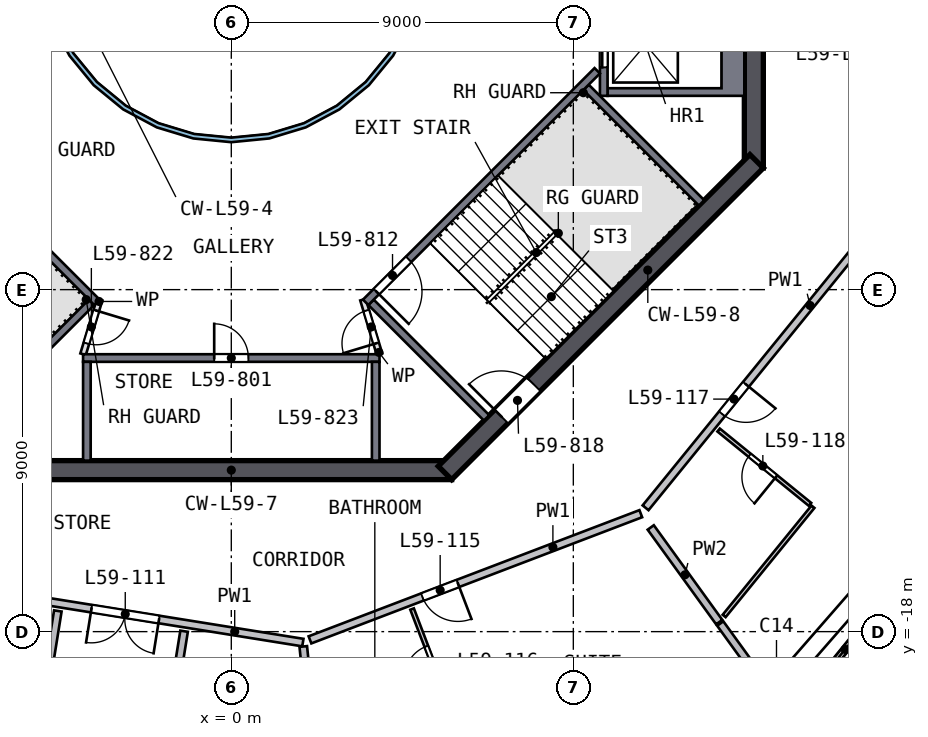
"""IFC4 building model, lengths in metres.
Left out: names, types, materials, properties, quantities, classifications, styles, units other than length and angle.
Written with IfcOpenShell. Run it as: python <this file> out.ifc"""

import sys

from ifc_helpers import new_model, si_unit, direction, frame, frame_2d, origin, place, context, subcontext, project, spatial, polyline, rectangle, outline, extrude, element, fill, save


model = new_model("IFC4")
c1 = context("Model", 3, precision=1e-05, world=origin(), true_north=direction((0.0, 1.0)))
c2 = subcontext(c1, "Body", "Model", "MODEL_VIEW")
j1 = project(units=[si_unit("LENGTHUNIT", "METRE"), si_unit("PLANEANGLEUNIT", "RADIAN")], contexts=[c1])
p1 = place(None, origin())
s1 = spatial("IfcSite", under=j1, at=p1, CompositionType="ELEMENT")
p2 = place(p1, origin())
s2 = spatial("IfcBuilding", under=s1, at=p2, CompositionType="ELEMENT")
p3 = place(p2, frame((0.0, 0.0, 241.0)))
s3 = spatial("IfcBuildingStorey", under=s2, at=p3, CompositionType="ELEMENT", Elevation=241.0)
p4 = place(p3, frame((13.75, -5.799, 0.0), z_axis=(0.0, 0.0, 1.0), x_axis=(0.0, 1.0, 0.0)))
e1 = element("IfcWall", 1, at=p4, inside=s3, PredefinedType="SHEAR", context=c2, shape_type="SweptSolid", body=[
    extrude(rectangle(XDim=11.598, YDim=0.5, at=frame_2d((5.799, 0.0))), origin(), (0.0, 0.0, 1.0), 3.5),
])
p5 = place(p4, frame((4.899, 0.0, 0.0)))
e2 = element("IfcOpeningElement", 2, at=p5, cuts=e1, PredefinedType="OPENING", context=c2, shape_type="SweptSolid", body=[
    extrude(rectangle(XDim=1.8, YDim=2.1, at=frame_2d((0.9, 1.05))), frame((0.0, 0.26, 0.0), z_axis=(0.0, -1.0, 0.0), x_axis=(1.0, 0.0, 0.0)), (0.0, 0.0, 1.0), 0.52),
])
p6 = place(p3, frame((-5.799, -13.75, 0.0), z_axis=(0.0, 0.0, 1.0), x_axis=(1.0, 0.0, 0.0)))
e3 = element("IfcWall", 3, at=p6, inside=s3, PredefinedType="SHEAR", context=c2, shape_type="SweptSolid", body=[
    extrude(rectangle(XDim=11.598, YDim=0.5, at=frame_2d((5.799, 0.0))), origin(), (0.0, 0.0, 1.0), 3.5),
])
p7 = place(p3, frame((5.622, -13.823, 0.0), z_axis=(0.0, 0.0, 1.0), x_axis=(0.707106781, 0.707106781, 0.0)))
e4 = element("IfcWall", 4, at=p7, inside=s3, PredefinedType="SHEAR", context=c2, shape_type="SweptSolid", body=[
    extrude(rectangle(XDim=11.598, YDim=0.5, at=frame_2d((5.799, 0.0))), origin(), (0.0, 0.0, 1.0), 3.5),
])
p8 = place(p7, frame((2.099, 0.0, 0.0)))
e5 = element("IfcOpeningElement", 5, at=p8, cuts=e4, PredefinedType="OPENING", context=c2, shape_type="SweptSolid", body=[
    extrude(rectangle(XDim=1.2, YDim=2.1, at=frame_2d((0.6, 1.05))), frame((0.0, 0.26, 0.0), z_axis=(0.0, -1.0, 0.0), x_axis=(1.0, 0.0, 0.0)), (0.0, 0.0, 1.0), 0.52),
])
p9 = place(p3, frame((14.724, -20.224, 0.0), z_axis=(0.0, 0.0, 1.0), x_axis=(0.630963708, 0.775812348, 0.0)))
e6 = element("IfcWall", 6, at=p9, inside=s3, PredefinedType="SOLIDWALL", context=c2, shape_type="SweptSolid", body=[
    extrude(rectangle(XDim=3.863, YDim=0.15, at=frame_2d((1.932, 0.0))), origin(), (0.0, 0.0, 1.0), 2.525),
])
p10 = place(p9, frame((1.063, 0.0, 0.0)))
e7 = element("IfcOpeningElement", 7, at=p10, cuts=e6, PredefinedType="OPENING", context=c2, shape_type="SweptSolid", body=[
    extrude(rectangle(XDim=2.4, YDim=2.4, at=frame_2d((1.2, 1.2))), frame((0.0, 0.085, 0.0), z_axis=(0.0, -1.0, 0.0), x_axis=(1.0, 0.0, 0.0)), (0.0, 0.0, 1.0), 0.17),
])
p11 = place(p3, origin())
e8 = element("IfcWall", 8, at=p11, inside=s3, PredefinedType="SOLIDWALL", context=c2, shape_type="SweptSolid", body=[
    extrude(outline(polyline([(13.5, -3.9), (9.9, -3.9), (9.9, -3.7), (12.9, -3.7), (12.9, -1.4), (9.9, -1.4), (9.9, -1.2), (13.5, -1.2), (13.5, -3.9)])), origin(), (0.0, 0.0, 1.0), 3.19),
])
p12 = place(p3, frame((9.8, -1.2, 0.0), z_axis=(0.0, 0.0, 1.0), x_axis=(0.0, -1.0, 0.0)))
e9 = element("IfcWall", 9, at=p12, inside=s3, PredefinedType="SOLIDWALL", context=c2, shape_type="SweptSolid", body=[
    extrude(rectangle(XDim=2.7, YDim=0.2, at=frame_2d((1.35, 0.0))), origin(), (0.0, 0.0, 1.0), 3.19),
])
p13 = place(p12, frame((0.75, 0.0, 0.0)))
e10 = element("IfcOpeningElement", 10, at=p13, cuts=e9, PredefinedType="OPENING", context=c2, shape_type="SweptSolid", body=[
    extrude(rectangle(XDim=1.2, YDim=2.1, at=frame_2d((0.6, 1.05))), frame((0.0, 0.11, 0.0), z_axis=(0.0, -1.0, 0.0), x_axis=(1.0, 0.0, 0.0)), (0.0, 0.0, 1.0), 0.22),
])
p14 = place(p3, frame((-3.9, -10.8, 0.0), z_axis=(0.0, 0.0, 1.0), x_axis=(1.0, 0.0, 0.0)))
e11 = element("IfcWall", 11, at=p14, inside=s3, PredefinedType="SOLIDWALL", context=c2, shape_type="SweptSolid", body=[
    extrude(rectangle(XDim=7.8, YDim=0.2, at=frame_2d((3.9, 0.0))), origin(), (0.0, 0.0, 1.0), 3.19),
])
p15 = place(p14, frame((3.45, 0.0, 0.0)))
e12 = element("IfcOpeningElement", 12, at=p15, cuts=e11, PredefinedType="OPENING", context=c2, shape_type="SweptSolid", body=[
    extrude(rectangle(XDim=0.9, YDim=2.1, at=frame_2d((0.45, 1.05))), frame((0.0, 0.11, 0.0), z_axis=(0.0, -1.0, 0.0), x_axis=(1.0, 0.0, 0.0)), (0.0, 0.0, 1.0), 0.22),
])
for number, where, z_axis, x_axis in (
    (13, (-3.8, -10.9, 0.0), (0.0, 0.0, 1.0), (0.0, -1.0, 0.0)),
    (14, (3.8, -10.9, 0.0), (0.0, 0.0, 1.0), (0.0, -1.0, 0.0)),
):
    element("IfcWall", number, at=place(p3, frame(where, z_axis=z_axis, x_axis=x_axis)), inside=s3, PredefinedType="SOLIDWALL", context=c2, shape_type="SweptSolid", body=[
        extrude(rectangle(XDim=2.6, YDim=0.2, at=frame_2d((1.3, 0.0))), origin(), (0.0, 0.0, 1.0), 3.19),
    ])
p16 = place(p3, frame((-3.535, -9.334, 0.0), z_axis=(0.0, 0.0, 1.0), x_axis=(-0.707120946, 0.707092617, 0.0)))
e15 = element("IfcWall", 15, at=p16, inside=s3, PredefinedType="SOLIDWALL", context=c2, shape_type="SweptSolid", body=[
    extrude(rectangle(XDim=8.618, YDim=0.2, at=frame_2d((4.309, 0.0))), origin(), (0.0, 0.0, 1.0), 3.19),
])
p17 = place(p16, frame((6.6, 0.0, 0.0)))
e16 = element("IfcOpeningElement", 16, at=p17, cuts=e15, PredefinedType="OPENING", context=c2, shape_type="SweptSolid", body=[
    extrude(rectangle(XDim=1.2, YDim=2.1, at=frame_2d((0.6, 1.05))), frame((0.0, 0.11, 0.0), z_axis=(0.0, -1.0, 0.0), x_axis=(1.0, 0.0, 0.0)), (0.0, 0.0, 1.0), 0.22),
])
p18 = place(p3, frame((-3.677, -9.334, 0.0), z_axis=(0.0, 0.0, 1.0), x_axis=(-0.707078393, -0.707135168, 0.0)))
e17 = element("IfcWall", 17, at=p18, inside=s3, PredefinedType="SOLIDWALL", context=c2, shape_type="SweptSolid", body=[
    extrude(rectangle(XDim=4.3, YDim=0.2, at=frame_2d((2.15, 0.0))), origin(), (0.0, 0.0, 1.0), 3.19),
])
p19 = place(p3, frame((9.629, -3.24, 0.0), z_axis=(0.0, 0.0, 1.0), x_axis=(-0.707120946, -0.707092617, 0.0)))
e18 = element("IfcWall", 18, at=p19, inside=s3, PredefinedType="SOLIDWALL", context=c2, shape_type="SweptSolid", body=[
    extrude(rectangle(XDim=8.618, YDim=0.2, at=frame_2d((4.309, 0.0))), origin(), (0.0, 0.0, 1.0), 3.19),
])
p20 = place(p19, frame((7.018, 0.0, 0.0)))
e19 = element("IfcOpeningElement", 19, at=p20, cuts=e18, PredefinedType="OPENING", context=c2, shape_type="SweptSolid", body=[
    extrude(rectangle(XDim=1.2, YDim=2.1, at=frame_2d((0.6, 1.05))), frame((0.0, 0.11, 0.0), z_axis=(0.0, -1.0, 0.0), x_axis=(1.0, 0.0, 0.0)), (0.0, 0.0, 1.0), 0.22),
])
for number, where, z_axis, x_axis in (
    (20, (3.677, -9.334, 0.0), (0.0, 0.0, 1.0), (0.707, -0.707, 0.0)),
    (21, (9.334, -3.677, 0.0), (0.0, 0.0, 1.0), (0.707, -0.707, 0.0)),
):
    element("IfcWall", number, at=place(p3, frame(where, z_axis=z_axis, x_axis=x_axis)), inside=s3, PredefinedType="SOLIDWALL", context=c2, shape_type="SweptSolid", body=[
        extrude(rectangle(XDim=4.3, YDim=0.2, at=frame_2d((2.15, 0.0))), origin(), (0.0, 0.0, 1.0), 3.19),
    ])
p21 = place(p3, frame((-3.465, -9.263, 0.0), z_axis=(0.0, 0.0, 1.0), x_axis=(-0.289808785, -0.957084567, 0.0)))
e22 = element("IfcWall", 22, at=p21, inside=s3, PredefinedType="PARTITIONING", context=c2, shape_type="SweptSolid", body=[
    extrude(rectangle(XDim=1.501, YDim=0.15, at=frame_2d((0.75, 0.0))), origin(), (0.0, 0.0, 1.0), 3.19),
])
p22 = place(p21, frame((0.301, 0.0, 0.0)))
e23 = element("IfcOpeningElement", 23, at=p22, cuts=e22, PredefinedType="OPENING", context=c2, shape_type="SweptSolid", body=[
    extrude(rectangle(XDim=0.9, YDim=2.1, at=frame_2d((0.45, 1.05))), frame((0.0, 0.085, 0.0), z_axis=(0.0, -1.0, 0.0), x_axis=(1.0, 0.0, 0.0)), (0.0, 0.0, 1.0), 0.17),
])
p23 = place(p3, frame((3.9, -10.7, 0.0), z_axis=(0.0, 0.0, 1.0), x_axis=(-0.289808785, 0.957084567, 0.0)))
e24 = element("IfcWall", 24, at=p23, inside=s3, PredefinedType="PARTITIONING", context=c2, shape_type="SweptSolid", body=[
    extrude(rectangle(XDim=1.501, YDim=0.15, at=frame_2d((0.75, 0.0))), origin(), (0.0, 0.0, 1.0), 3.19),
])
p24 = place(p23, frame((0.301, 0.0, 0.0)))
e25 = element("IfcOpeningElement", 25, at=p24, cuts=e24, PredefinedType="OPENING", context=c2, shape_type="SweptSolid", body=[
    extrude(rectangle(XDim=0.9, YDim=2.1, at=frame_2d((0.45, 1.05))), frame((0.0, 0.085, 0.0), z_axis=(0.0, -1.0, 0.0), x_axis=(1.0, 0.0, 0.0)), (0.0, 0.0, 1.0), 0.17),
])
p25 = place(p3, origin())
e26 = element("IfcWall", 26, at=p25, inside=s3, PredefinedType="SOLIDWALL", context=c2, shape_type="SweptSolid", body=[
    extrude(outline(polyline([(5.021, -0.999), (4.73, -1.959), (4.257, -2.844), (3.62, -3.62), (2.844, -4.257), (1.959, -4.73), (0.999, -5.021), (0.0, -5.12), (-0.999, -5.021), (-1.959, -4.73), (-2.844, -4.257), (-3.62, -3.62), (-4.257, -2.844), (-4.73, -1.959), (-5.021, -0.999), (-5.12, 0.0), (-5.021, 0.999), (-4.73, 1.959), (-4.257, 2.844), (-3.62, 3.62), (-2.844, 4.257), (-1.959, 4.73), (-0.999, 5.021), (0.0, 5.12), (0.999, 5.021), (1.959, 4.73), (2.844, 4.257), (3.62, 3.62), (4.257, 2.844), (4.73, 1.959), (5.021, 0.999), (5.12, 0.0), (5.021, -0.999)]), holes=[polyline([(4.904, 0.976), (4.619, 1.913), (4.157, 2.778), (3.535, 3.535), (2.778, 4.157), (1.913, 4.619), (0.976, 4.904), (0.0, 5.0), (-0.976, 4.904), (-1.913, 4.619), (-2.778, 4.157), (-3.535, 3.535), (-4.157, 2.778), (-4.619, 1.913), (-4.904, 0.976), (-5.0, 0.0), (-4.904, -0.976), (-4.619, -1.913), (-4.157, -2.778), (-3.535, -3.535), (-2.778, -4.157), (-1.913, -4.619), (-0.976, -4.904), (0.0, -5.0), (0.976, -4.904), (1.913, -4.619), (2.778, -4.157), (3.535, -3.535), (4.157, -2.778), (4.619, -1.913), (4.904, -0.976), (5.0, 0.0), (4.904, 0.976)])]), origin(), (0.0, 0.0, 1.0), 3.19),
])
p26 = place(p3, frame((1.883, -18.288, 0.0), z_axis=(0.0, 0.0, 1.0), x_axis=(-0.987356604, 0.158514786, 0.0)))
e27 = element("IfcWall", 27, at=p26, inside=s3, PredefinedType="SOLIDWALL", context=c2, shape_type="SweptSolid", body=[
    extrude(rectangle(XDim=9.316, YDim=0.2, at=frame_2d((4.658, 0.0))), origin(), (0.0, 0.0, 1.0), 3.19),
])
p27 = place(p26, frame((3.833, 0.0, 0.0)))
e28 = element("IfcOpeningElement", 28, at=p27, cuts=e27, PredefinedType="OPENING", context=c2, shape_type="SweptSolid", body=[
    extrude(rectangle(XDim=1.8, YDim=2.1, at=frame_2d((0.9, 1.05))), frame((0.0, 0.11, 0.0), z_axis=(0.0, -1.0, 0.0), x_axis=(1.0, 0.0, 0.0)), (0.0, 0.0, 1.0), 0.22),
])
p28 = place(p3, frame((10.775, -14.896, 0.0), z_axis=(0.0, 0.0, 1.0), x_axis=(-0.93432948, -0.356410469, 0.0)))
e29 = element("IfcWall", 29, at=p28, inside=s3, PredefinedType="SOLIDWALL", context=c2, shape_type="SweptSolid", body=[
    extrude(rectangle(XDim=9.317, YDim=0.2, at=frame_2d((4.658, 0.0))), origin(), (0.0, 0.0, 1.0), 3.19),
])
p29 = place(p28, frame((5.15, 0.0, 0.0)))
e30 = element("IfcOpeningElement", 30, at=p29, cuts=e29, PredefinedType="OPENING", context=c2, shape_type="SweptSolid", body=[
    extrude(rectangle(XDim=1.0, YDim=2.1, at=frame_2d((0.5, 1.05))), frame((0.0, 0.11, 0.0), z_axis=(0.0, -1.0, 0.0), x_axis=(1.0, 0.0, 0.0)), (0.0, 0.0, 1.0), 0.22),
])
p30 = place(p3, frame((16.792, -7.497, 0.0), z_axis=(0.0, 0.0, 1.0), x_axis=(-0.630941046, -0.775830778, 0.0)))
e31 = element("IfcWall", 31, at=p30, inside=s3, PredefinedType="SOLIDWALL", context=c2, shape_type="SweptSolid", body=[
    extrude(rectangle(XDim=9.337, YDim=0.2, at=frame_2d((4.668, 0.0))), origin(), (0.0, 0.0, 1.0), 3.19),
])
p31 = place(p30, frame((5.15, 0.0, 0.0)))
e32 = element("IfcOpeningElement", 32, at=p31, cuts=e31, PredefinedType="OPENING", context=c2, shape_type="SweptSolid", body=[
    extrude(rectangle(XDim=1.0, YDim=2.1, at=frame_2d((0.5, 1.05))), frame((0.0, 0.11, 0.0), z_axis=(0.0, -1.0, 0.0), x_axis=(1.0, 0.0, 0.0)), (0.0, 0.0, 1.0), 0.22),
])
p32 = place(p3, frame((-6.198, -27.627, 0.0), z_axis=(0.0, 0.0, 1.0), x_axis=(0.158496989, 0.987359461, 0.0)))
e33 = element("IfcWall", 33, at=p32, inside=s3, PredefinedType="SOLIDWALL", context=c2, shape_type="SweptSolid", body=[
    extrude(rectangle(XDim=10.302, YDim=0.2, at=frame_2d((5.151, 0.0))), origin(), (0.0, 0.0, 1.0), 3.19),
])
p33 = place(p32, frame((2.5, 0.0, 0.0)))
e34 = element("IfcOpeningElement", 34, at=p33, cuts=e33, PredefinedType="OPENING", context=c2, shape_type="SweptSolid", body=[
    extrude(rectangle(XDim=1.0, YDim=2.1, at=frame_2d((0.5, 1.05))), frame((0.0, 0.11, 0.0), z_axis=(0.0, -1.0, 0.0), x_axis=(1.0, 0.0, 0.0)), (0.0, 0.0, 1.0), 0.22),
])
p34 = place(p3, frame((-1.242, -17.989, 0.0), z_axis=(0.0, 0.0, 1.0), x_axis=(-0.158496989, -0.987359461, 0.0)))
e35 = element("IfcWall", 35, at=p34, inside=s3, PredefinedType="SOLIDWALL", context=c2, shape_type="SweptSolid", body=[
    extrude(rectangle(XDim=10.302, YDim=0.2, at=frame_2d((5.151, 0.0))), origin(), (0.0, 0.0, 1.0), 3.19),
])
p35 = place(p34, frame((2.95, 0.0, 0.0)))
e36 = element("IfcOpeningElement", 36, at=p35, cuts=e35, PredefinedType="OPENING", context=c2, shape_type="SweptSolid", body=[
    extrude(rectangle(XDim=1.0, YDim=2.1, at=frame_2d((0.5, 1.05))), frame((0.0, 0.11, 0.0), z_axis=(0.0, -1.0, 0.0), x_axis=(1.0, 0.0, 0.0)), (0.0, 0.0, 1.0), 0.22),
])
p36 = place(p3, frame((1.894, -18.391, 0.0), z_axis=(0.0, 0.0, 1.0), x_axis=(0.102416674, -0.994741587, 0.0)))
e37 = element("IfcWall", 37, at=p36, inside=s3, PredefinedType="SOLIDWALL", context=c2, shape_type="SweptSolid", body=[
    extrude(rectangle(XDim=3.418, YDim=0.2, at=frame_2d((1.709, 0.0))), origin(), (0.0, 0.0, 1.0), 3.19),
])
p37 = place(p3, frame((11.037, -15.259, 0.0), z_axis=(0.0, 0.0, 1.0), x_axis=(0.586087623, -0.810247677, 0.0)))
e38 = element("IfcWall", 38, at=p37, inside=s3, PredefinedType="SOLIDWALL", context=c2, shape_type="SweptSolid", body=[
    extrude(rectangle(XDim=3.075, YDim=0.2, at=frame_2d((1.537, 0.0))), origin(), (0.0, 0.0, 1.0), 3.19),
])
p38 = place(p3, frame((12.866, -17.787, 0.0), z_axis=(0.0, 0.0, 1.0), x_axis=(0.586082417, -0.810251443, 0.0)))
e39 = element("IfcWall", 39, at=p38, inside=s3, PredefinedType="SOLIDWALL", context=c2, shape_type="SweptSolid", body=[
    extrude(rectangle(XDim=3.011, YDim=0.2, at=frame_2d((1.506, 0.0))), origin(), (0.0, 0.0, 1.0), 3.19),
])
p39 = place(p3, frame((5.863, -20.302, 0.0), z_axis=(0.0, 0.0, 1.0), x_axis=(-0.356391594, 0.93433668, 0.0)))
e40 = element("IfcWall", 40, at=p39, inside=s3, PredefinedType="PARTITIONING", context=c2, shape_type="SweptSolid", body=[
    extrude(rectangle(XDim=3.1, YDim=0.1, at=frame_2d((1.55, 0.0))), origin(), (0.0, 0.0, 1.0), 3.19),
])
p40 = place(p39, frame((1.15, 0.0, 0.0)))
e41 = element("IfcOpeningElement", 41, at=p40, cuts=e40, PredefinedType="OPENING", context=c2, shape_type="SweptSolid", body=[
    extrude(rectangle(XDim=0.9, YDim=2.1, at=frame_2d((0.45, 1.05))), frame((0.0, 0.06, 0.0), z_axis=(0.0, -1.0, 0.0), x_axis=(1.0, 0.0, 0.0)), (0.0, 0.0, 1.0), 0.12),
])
p41 = place(p3, frame((15.228, -14.651, 0.0), z_axis=(0.0, 0.0, 1.0), x_axis=(-0.775834504, 0.630936464, 0.0)))
e42 = element("IfcWall", 42, at=p41, inside=s3, PredefinedType="PARTITIONING", context=c2, shape_type="SweptSolid", body=[
    extrude(rectangle(XDim=3.1, YDim=0.1, at=frame_2d((1.55, 0.0))), origin(), (0.0, 0.0, 1.0), 3.19),
])
p42 = place(p41, frame((1.15, 0.0, 0.0)))
e43 = element("IfcOpeningElement", 43, at=p42, cuts=e42, PredefinedType="OPENING", context=c2, shape_type="SweptSolid", body=[
    extrude(rectangle(XDim=0.9, YDim=2.1, at=frame_2d((0.45, 1.05))), frame((0.0, 0.06, 0.0), z_axis=(0.0, -1.0, 0.0), x_axis=(1.0, 0.0, 0.0)), (0.0, 0.0, 1.0), 0.12),
])
p43 = place(p3, frame((15.306, -14.714, 0.0), z_axis=(0.0, 0.0, 1.0), x_axis=(-0.630952346, -0.775821588, 0.0)))
e44 = element("IfcWall", 44, at=p43, inside=s3, PredefinedType="PARTITIONING", context=c2, shape_type="SweptSolid", body=[
    extrude(rectangle(XDim=3.704, YDim=0.1, at=frame_2d((1.852, 0.0))), origin(), (0.0, 0.0, 1.0), 3.19),
])
p44 = place(p10, origin())
e45 = element("IfcDoor", 45, at=p44, inside=s3, OperationType="SLIDING_TO_LEFT", PredefinedType="DOOR", context=c2, shape_type="SweptSolid", body=[
    extrude(rectangle(XDim=2.4, YDim=2.4, at=frame_2d((1.2, 1.2))), frame((0.0, 0.025, 0.0), z_axis=(0.0, -1.0, 0.0), x_axis=(1.0, 0.0, 0.0)), (0.0, 0.0, 1.0), 0.05),
])
fill(e7, e45)
p45 = place(p15, origin())
e46 = element("IfcDoor", 46, at=p45, inside=s3, OperationType="SINGLE_SWING_LEFT", PredefinedType="DOOR", context=c2, shape_type="SweptSolid", body=[
    extrude(rectangle(XDim=0.9, YDim=2.1, at=frame_2d((0.45, 1.05))), frame((0.0, 0.025, 0.0), z_axis=(0.0, -1.0, 0.0), x_axis=(1.0, 0.0, 0.0)), (0.0, 0.0, 1.0), 0.05),
])
fill(e12, e46)
p46 = place(p13, origin())
e47 = element("IfcDoor", 47, at=p46, inside=s3, OperationType="DOUBLE_DOOR_SLIDING", PredefinedType="DOOR", context=c2, shape_type="SweptSolid", body=[
    extrude(rectangle(XDim=1.2, YDim=2.1, at=frame_2d((0.6, 1.05))), frame((0.0, 0.025, 0.0), z_axis=(0.0, -1.0, 0.0), x_axis=(1.0, 0.0, 0.0)), (0.0, 0.0, 1.0), 0.05),
])
fill(e10, e47)
p47 = place(p20, origin())
e48 = element("IfcDoor", 48, at=p47, inside=s3, OperationType="SINGLE_SWING_RIGHT", PredefinedType="DOOR", context=c2, shape_type="SweptSolid", body=[
    extrude(rectangle(XDim=1.2, YDim=2.1, at=frame_2d((0.6, 1.05))), frame((0.0, 0.025, 0.0), z_axis=(0.0, -1.0, 0.0), x_axis=(1.0, 0.0, 0.0)), (0.0, 0.0, 1.0), 0.05),
])
fill(e19, e48)
p48 = place(p8, origin())
e49 = element("IfcDoor", 49, at=p48, inside=s3, OperationType="SINGLE_SWING_LEFT", PredefinedType="DOOR", context=c2, shape_type="SweptSolid", body=[
    extrude(rectangle(XDim=1.2, YDim=2.1, at=frame_2d((0.6, 1.05))), frame((0.0, 0.025, 0.0), z_axis=(0.0, -1.0, 0.0), x_axis=(1.0, 0.0, 0.0)), (0.0, 0.0, 1.0), 0.05),
])
fill(e5, e49)
p49 = place(p22, origin())
e50 = element("IfcDoor", 50, at=p49, inside=s3, OperationType="SINGLE_SWING_LEFT", PredefinedType="DOOR", context=c2, shape_type="SweptSolid", body=[
    extrude(rectangle(XDim=0.9, YDim=2.1, at=frame_2d((0.45, 1.05))), frame((0.0, 0.025, 0.0), z_axis=(0.0, -1.0, 0.0), x_axis=(1.0, 0.0, 0.0)), (0.0, 0.0, 1.0), 0.05),
])
fill(e23, e50)
p50 = place(p24, origin())
e51 = element("IfcDoor", 51, at=p50, inside=s3, OperationType="SINGLE_SWING_LEFT", PredefinedType="DOOR", context=c2, shape_type="SweptSolid", body=[
    extrude(rectangle(XDim=0.9, YDim=2.1, at=frame_2d((0.45, 1.05))), frame((0.0, 0.025, 0.0), z_axis=(0.0, -1.0, 0.0), x_axis=(1.0, 0.0, 0.0)), (0.0, 0.0, 1.0), 0.05),
])
fill(e25, e51)
p51 = place(p27, origin())
e52 = element("IfcDoor", 52, at=p51, inside=s3, OperationType="DOUBLE_DOOR_SINGLE_SWING", PredefinedType="DOOR", context=c2, shape_type="SweptSolid", body=[
    extrude(rectangle(XDim=1.8, YDim=2.1, at=frame_2d((0.9, 1.05))), frame((0.0, 0.025, 0.0), z_axis=(0.0, -1.0, 0.0), x_axis=(1.0, 0.0, 0.0)), (0.0, 0.0, 1.0), 0.05),
])
fill(e28, e52)
p52 = place(p29, origin())
e53 = element("IfcDoor", 53, at=p52, inside=s3, OperationType="SINGLE_SWING_LEFT", PredefinedType="DOOR", context=c2, shape_type="SweptSolid", body=[
    extrude(rectangle(XDim=1.0, YDim=2.1, at=frame_2d((0.5, 1.05))), frame((0.0, 0.025, 0.0), z_axis=(0.0, -1.0, 0.0), x_axis=(1.0, 0.0, 0.0)), (0.0, 0.0, 1.0), 0.05),
])
fill(e30, e53)
p53 = place(p40, origin())
e54 = element("IfcDoor", 54, at=p53, inside=s3, OperationType="SINGLE_SWING_LEFT", PredefinedType="DOOR", context=c2, shape_type="SweptSolid", body=[
    extrude(rectangle(XDim=0.9, YDim=2.1, at=frame_2d((0.45, 1.05))), frame((0.0, 0.025, 0.0), z_axis=(0.0, -1.0, 0.0), x_axis=(1.0, 0.0, 0.0)), (0.0, 0.0, 1.0), 0.05),
])
fill(e41, e54)
p54 = place(p31, origin())
e55 = element("IfcDoor", 55, at=p54, inside=s3, OperationType="SINGLE_SWING_LEFT", PredefinedType="DOOR", context=c2, shape_type="SweptSolid", body=[
    extrude(rectangle(XDim=1.0, YDim=2.1, at=frame_2d((0.5, 1.05))), frame((0.0, 0.025, 0.0), z_axis=(0.0, -1.0, 0.0), x_axis=(1.0, 0.0, 0.0)), (0.0, 0.0, 1.0), 0.05),
])
fill(e32, e55)
p55 = place(p42, origin())
e56 = element("IfcDoor", 56, at=p55, inside=s3, OperationType="SINGLE_SWING_LEFT", PredefinedType="DOOR", context=c2, shape_type="SweptSolid", body=[
    extrude(rectangle(XDim=0.9, YDim=2.1, at=frame_2d((0.45, 1.05))), frame((0.0, 0.025, 0.0), z_axis=(0.0, -1.0, 0.0), x_axis=(1.0, 0.0, 0.0)), (0.0, 0.0, 1.0), 0.05),
])
fill(e43, e56)
save(model, sys.argv[1])
